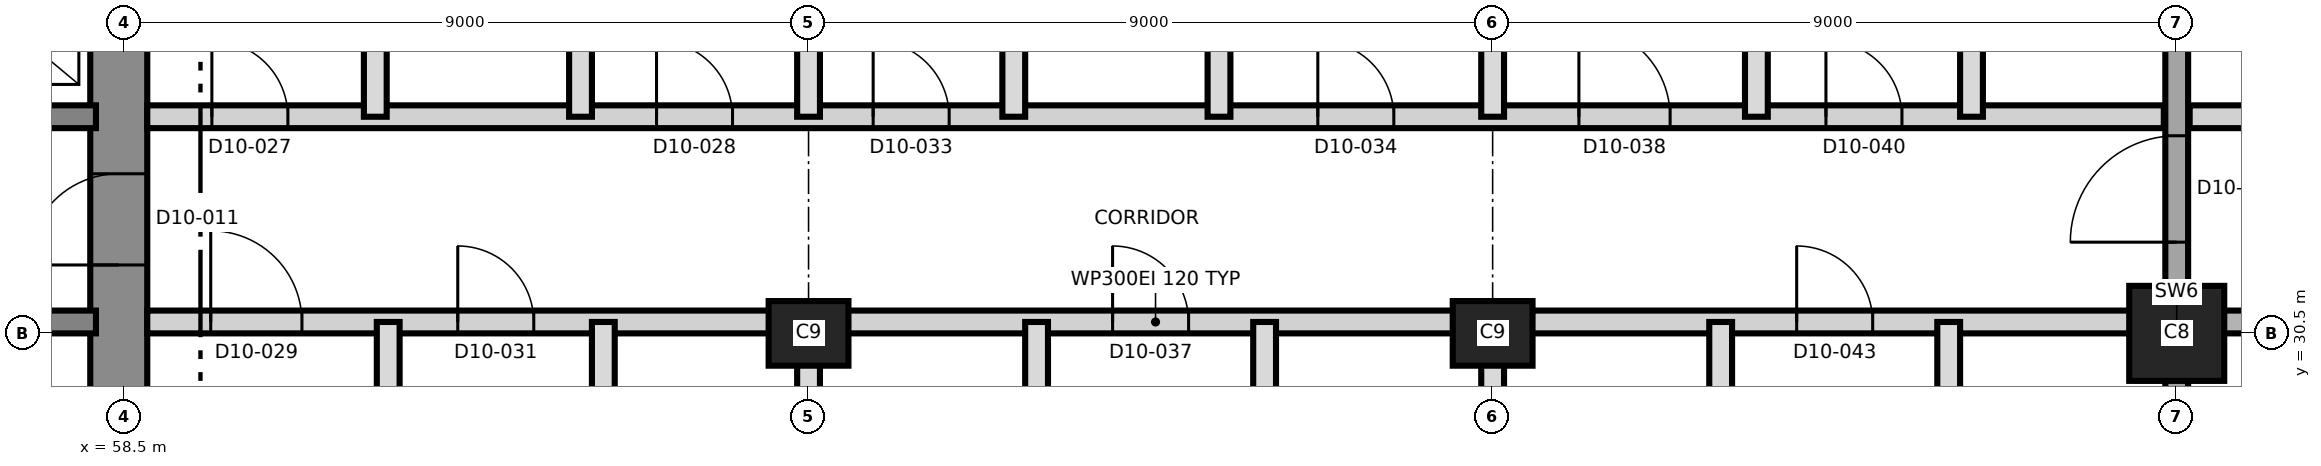
"""IFC4 building model, lengths in metres.
Left out: names, types, materials, properties, quantities, classifications, styles, units other than length and angle.
Written with IfcOpenShell. Run it as: python <this file> out.ifc"""

import sys

from ifc_helpers import new_model, si_unit, direction, frame, frame_2d, origin, origin_2d, place, context, subcontext, project, spatial, rectangle, extrude, element, fill, save


model = new_model("IFC4")
c1 = context("Model", 3, precision=1e-05, world=origin(), true_north=direction((0.0, 1.0)))
c2 = subcontext(c1, "Body", "Model", "MODEL_VIEW")
j1 = project(units=[si_unit("LENGTHUNIT", "METRE"), si_unit("PLANEANGLEUNIT", "RADIAN")], contexts=[c1])
p1 = place(None, origin())
s1 = spatial("IfcSite", under=j1, at=p1, CompositionType="ELEMENT")
p2 = place(p1, origin())
s2 = spatial("IfcBuilding", under=s1, at=p2, CompositionType="ELEMENT")
p3 = place(p2, frame((0.0, 0.0, 120.4)))
s3 = spatial("IfcBuildingStorey", under=s2, at=p3, CompositionType="ELEMENT", Elevation=120.4)
p4 = place(p3, frame((58.425, 21.125, 0.0), z_axis=(0.0, 0.0, 1.0), x_axis=(0.0, 1.0, 0.0)))
e1 = element("IfcWall", 1, at=p4, inside=s3, PredefinedType="SHEAR", context=c2, shape_type="SweptSolid", body=[
    extrude(rectangle(XDim=18.75, YDim=0.75, at=frame_2d((9.375, 0.0))), origin(), (0.0, 0.0, 1.0), 3.7),
])
p5 = place(p4, frame((10.275, 0.0, 0.0)))
e2 = element("IfcOpeningElement", 2, at=p5, cuts=e1, PredefinedType="OPENING", context=c2, shape_type="SweptSolid", body=[
    extrude(rectangle(XDim=1.2, YDim=2.1, at=frame_2d((0.6, 1.05))), frame((0.0, 0.385, 0.0), z_axis=(0.0, -1.0, 0.0), x_axis=(1.0, 0.0, 0.0)), (0.0, 0.0, 1.0), 0.77),
])
p6 = place(p3, frame((31.875, 30.65, 0.0), z_axis=(0.0, 0.0, 1.0), x_axis=(1.0, 0.0, 0.0)))
e3 = element("IfcWall", 3, at=p6, inside=s3, PredefinedType="SHEAR", context=c2, shape_type="SweptSolid", body=[
    extrude(rectangle(XDim=26.25, YDim=0.3, at=frame_2d((13.125, 0.0))), origin(), (0.0, 0.0, 1.0), 3.7),
])
p7 = place(p6, frame((24.625, 0.0, 0.0)))
e4 = element("IfcOpeningElement", 4, at=p7, cuts=e3, PredefinedType="OPENING", context=c2, shape_type="SweptSolid", body=[
    extrude(rectangle(XDim=1.0, YDim=2.1, at=frame_2d((0.5, 1.05))), frame((0.0, 0.16, 0.0), z_axis=(0.0, -1.0, 0.0), x_axis=(1.0, 0.0, 0.0)), (0.0, 0.0, 1.0), 0.32),
])
p8 = place(p6, frame((11.425, 0.0, 0.0)))
e5 = element("IfcOpeningElement", 5, at=p8, cuts=e3, PredefinedType="OPENING", context=c2, shape_type="SweptSolid", body=[
    extrude(rectangle(XDim=1.0, YDim=2.1, at=frame_2d((0.5, 1.05))), frame((0.0, 0.16, 0.0), z_axis=(0.0, -1.0, 0.0), x_axis=(1.0, 0.0, 0.0)), (0.0, 0.0, 1.0), 0.32),
])
p9 = place(p3, frame((31.875, 33.35, 0.0), z_axis=(0.0, 0.0, 1.0), x_axis=(1.0, 0.0, 0.0)))
e6 = element("IfcWall", 6, at=p9, inside=s3, PredefinedType="SHEAR", context=c2, shape_type="SweptSolid", body=[
    extrude(rectangle(XDim=26.25, YDim=0.3, at=frame_2d((13.125, 0.0))), origin(), (0.0, 0.0, 1.0), 3.7),
])
p10 = place(p9, frame((13.775, 0.0, 0.0)))
e7 = element("IfcOpeningElement", 7, at=p10, cuts=e6, PredefinedType="OPENING", context=c2, shape_type="SweptSolid", body=[
    extrude(rectangle(XDim=1.4, YDim=2.1, at=frame_2d((0.7, 1.05))), frame((0.0, 0.16, 0.0), z_axis=(0.0, -1.0, 0.0), x_axis=(1.0, 0.0, 0.0)), (0.0, 0.0, 1.0), 0.32),
])
p11 = place(p9, frame((5.25, 0.0, 0.0)))
e8 = element("IfcOpeningElement", 8, at=p11, cuts=e6, PredefinedType="OPENING", context=c2, shape_type="SweptSolid", body=[
    extrude(rectangle(XDim=1.2, YDim=2.1, at=frame_2d((0.6, 1.05))), frame((0.0, 0.16, 0.0), z_axis=(0.0, -1.0, 0.0), x_axis=(1.0, 0.0, 0.0)), (0.0, 0.0, 1.0), 0.32),
])
p12 = place(p9, frame((19.8, 0.0, 0.0)))
e9 = element("IfcOpeningElement", 9, at=p12, cuts=e6, PredefinedType="OPENING", context=c2, shape_type="SweptSolid", body=[
    extrude(rectangle(XDim=1.2, YDim=2.1, at=frame_2d((0.6, 1.05))), frame((0.0, 0.16, 0.0), z_axis=(0.0, -1.0, 0.0), x_axis=(1.0, 0.0, 0.0)), (0.0, 0.0, 1.0), 0.32),
])
for number, where, z_axis, x_axis in (
    (10, (67.5, 30.5, 0.0), (0.0, 0.0, 1.0), (1.0, 0.0, 0.0)),
    (11, (76.5, 30.5, 0.0), (0.0, 0.0, 1.0), (1.0, 0.0, 0.0)),
):
    element("IfcColumn", number, at=place(p3, frame(where, z_axis=z_axis, x_axis=x_axis)), inside=s3, PredefinedType="COLUMN", context=c2, shape_type="SweptSolid", body=[
        extrude(rectangle(XDim=1.05, YDim=0.85, at=origin_2d()), origin(), (0.0, 0.0, 1.0), 3.7),
    ])
p13 = place(p3, frame((85.5, 30.5, 0.0), z_axis=(0.0, 0.0, 1.0), x_axis=(1.0, 0.0, 0.0)))
e12 = element("IfcColumn", 12, at=p13, inside=s3, PredefinedType="COLUMN", context=c2, shape_type="SweptSolid", body=[
    extrude(rectangle(XDim=1.25, YDim=1.25, at=origin_2d()), origin(), (0.0, 0.0, 1.0), 3.7),
])
p14 = place(p3, frame((85.5, 19.275, 0.0), z_axis=(0.0, 0.0, 1.0), x_axis=(0.0, 1.0, 0.0)))
e13 = element("IfcWall", 13, at=p14, inside=s3, PredefinedType="SHEAR", context=c2, shape_type="SweptSolid", body=[
    extrude(rectangle(XDim=22.45, YDim=0.3, at=frame_2d((11.225, 0.0))), origin(), (0.0, 0.0, 1.0), 3.7),
])
p15 = place(p14, frame((12.425, 0.0, 0.0)))
e14 = element("IfcOpeningElement", 14, at=p15, cuts=e13, PredefinedType="OPENING", context=c2, shape_type="SweptSolid", body=[
    extrude(rectangle(XDim=1.4, YDim=2.1, at=frame_2d((0.7, 1.05))), frame((0.0, 0.16, 0.0), z_axis=(0.0, -1.0, 0.0), x_axis=(1.0, 0.0, 0.0)), (0.0, 0.0, 1.0), 0.32),
])
p16 = place(p3, frame((58.8, 30.65, 0.0), z_axis=(0.0, 0.0, 1.0), x_axis=(1.0, 0.0, 0.0)))
e15 = element("IfcWall", 15, at=p16, inside=s3, PredefinedType="PARTITIONING", context=c2, shape_type="SweptSolid", body=[
    extrude(rectangle(XDim=26.53, YDim=0.3, at=frame_2d((13.265, 0.0))), origin(), (0.0, 0.0, 1.0), 3.4),
])
p17 = place(p16, frame((0.835, 0.0, 0.0)))
e16 = element("IfcOpeningElement", 16, at=p17, cuts=e15, PredefinedType="OPENING", context=c2, shape_type="SweptSolid", body=[
    extrude(rectangle(XDim=1.2, YDim=2.1, at=frame_2d((0.6, 1.05))), frame((0.0, 0.16, 0.0), z_axis=(0.0, -1.0, 0.0), x_axis=(1.0, 0.0, 0.0)), (0.0, 0.0, 1.0), 0.32),
])
p18 = place(p16, frame((4.085, 0.0, 0.0)))
e17 = element("IfcOpeningElement", 17, at=p18, cuts=e15, PredefinedType="OPENING", context=c2, shape_type="SweptSolid", body=[
    extrude(rectangle(XDim=1.0, YDim=2.1, at=frame_2d((0.5, 1.05))), frame((0.0, 0.16, 0.0), z_axis=(0.0, -1.0, 0.0), x_axis=(1.0, 0.0, 0.0)), (0.0, 0.0, 1.0), 0.32),
])
p19 = place(p16, frame((12.7, 0.0, 0.0)))
e18 = element("IfcOpeningElement", 18, at=p19, cuts=e15, PredefinedType="OPENING", context=c2, shape_type="SweptSolid", body=[
    extrude(rectangle(XDim=1.0, YDim=2.4, at=frame_2d((0.5, 1.2))), frame((0.0, 0.16, 0.0), z_axis=(0.0, -1.0, 0.0), x_axis=(1.0, 0.0, 0.0)), (0.0, 0.0, 1.0), 0.32),
])
p20 = place(p16, frame((21.7, 0.0, 0.0)))
e19 = element("IfcOpeningElement", 19, at=p20, cuts=e15, PredefinedType="OPENING", context=c2, shape_type="SweptSolid", body=[
    extrude(rectangle(XDim=1.0, YDim=2.4, at=frame_2d((0.5, 1.2))), frame((0.0, 0.16, 0.0), z_axis=(0.0, -1.0, 0.0), x_axis=(1.0, 0.0, 0.0)), (0.0, 0.0, 1.0), 0.32),
])
p21 = place(p3, frame((85.67, 30.65, 0.0), z_axis=(0.0, 0.0, 1.0), x_axis=(1.0, 0.0, 0.0)))
e20 = element("IfcWall", 20, at=p21, inside=s3, PredefinedType="SHEAR", context=c2, shape_type="SweptSolid", body=[
    extrude(rectangle(XDim=9.58, YDim=0.3, at=frame_2d((4.79, 0.0))), origin(), (0.0, 0.0, 1.0), 3.4),
])
p22 = place(p21, frame((2.08, 0.0, 0.0)))
e21 = element("IfcOpeningElement", 21, at=p22, cuts=e20, PredefinedType="OPENING", context=c2, shape_type="SweptSolid", body=[
    extrude(rectangle(XDim=1.2, YDim=2.1, at=frame_2d((0.6, 1.05))), frame((0.0, 0.16, 0.0), z_axis=(0.0, -1.0, 0.0), x_axis=(1.0, 0.0, 0.0)), (0.0, 0.0, 1.0), 0.32),
])
p23 = place(p21, frame((5.63, 0.0, 0.0)))
e22 = element("IfcOpeningElement", 22, at=p23, cuts=e20, PredefinedType="OPENING", context=c2, shape_type="SweptSolid", body=[
    extrude(rectangle(XDim=1.0, YDim=2.1, at=frame_2d((0.5, 1.05))), frame((0.0, 0.16, 0.0), z_axis=(0.0, -1.0, 0.0), x_axis=(1.0, 0.0, 0.0)), (0.0, 0.0, 1.0), 0.32),
])
p24 = place(p3, frame((58.8, 33.35, 0.0), z_axis=(0.0, 0.0, 1.0), x_axis=(1.0, 0.0, 0.0)))
e23 = element("IfcWall", 23, at=p24, inside=s3, PredefinedType="PARTITIONING", context=c2, shape_type="SweptSolid", body=[
    extrude(rectangle(XDim=26.53, YDim=0.3, at=frame_2d((13.265, 0.0))), origin(), (0.0, 0.0, 1.0), 3.4),
])
p25 = place(p24, frame((0.85, 0.0, 0.0)))
e24 = element("IfcOpeningElement", 24, at=p25, cuts=e23, PredefinedType="OPENING", context=c2, shape_type="SweptSolid", body=[
    extrude(rectangle(XDim=1.0, YDim=2.1, at=frame_2d((0.5, 1.05))), frame((0.0, 0.16, 0.0), z_axis=(0.0, -1.0, 0.0), x_axis=(1.0, 0.0, 0.0)), (0.0, 0.0, 1.0), 0.32),
])
p26 = place(p24, frame((6.7, 0.0, 0.0)))
e25 = element("IfcOpeningElement", 25, at=p26, cuts=e23, PredefinedType="OPENING", context=c2, shape_type="SweptSolid", body=[
    extrude(rectangle(XDim=1.0, YDim=2.1, at=frame_2d((0.5, 1.05))), frame((0.0, 0.16, 0.0), z_axis=(0.0, -1.0, 0.0), x_axis=(1.0, 0.0, 0.0)), (0.0, 0.0, 1.0), 0.32),
])
p27 = place(p24, frame((9.55, 0.0, 0.0)))
e26 = element("IfcOpeningElement", 26, at=p27, cuts=e23, PredefinedType="OPENING", context=c2, shape_type="SweptSolid", body=[
    extrude(rectangle(XDim=1.0, YDim=2.1, at=frame_2d((0.5, 1.05))), frame((0.0, 0.16, 0.0), z_axis=(0.0, -1.0, 0.0), x_axis=(1.0, 0.0, 0.0)), (0.0, 0.0, 1.0), 0.32),
])
p28 = place(p24, frame((15.4, 0.0, 0.0)))
e27 = element("IfcOpeningElement", 27, at=p28, cuts=e23, PredefinedType="OPENING", context=c2, shape_type="SweptSolid", body=[
    extrude(rectangle(XDim=1.0, YDim=2.1, at=frame_2d((0.5, 1.05))), frame((0.0, 0.16, 0.0), z_axis=(0.0, -1.0, 0.0), x_axis=(1.0, 0.0, 0.0)), (0.0, 0.0, 1.0), 0.32),
])
p29 = place(p24, frame((18.835, 0.0, 0.0)))
e28 = element("IfcOpeningElement", 28, at=p29, cuts=e23, PredefinedType="OPENING", context=c2, shape_type="SweptSolid", body=[
    extrude(rectangle(XDim=1.2, YDim=2.1, at=frame_2d((0.6, 1.05))), frame((0.0, 0.16, 0.0), z_axis=(0.0, -1.0, 0.0), x_axis=(1.0, 0.0, 0.0)), (0.0, 0.0, 1.0), 0.32),
])
p30 = place(p24, frame((22.085, 0.0, 0.0)))
e29 = element("IfcOpeningElement", 29, at=p30, cuts=e23, PredefinedType="OPENING", context=c2, shape_type="SweptSolid", body=[
    extrude(rectangle(XDim=1.0, YDim=2.1, at=frame_2d((0.5, 1.05))), frame((0.0, 0.16, 0.0), z_axis=(0.0, -1.0, 0.0), x_axis=(1.0, 0.0, 0.0)), (0.0, 0.0, 1.0), 0.32),
])
p31 = place(p3, frame((85.67, 33.35, 0.0), z_axis=(0.0, 0.0, 1.0), x_axis=(1.0, 0.0, 0.0)))
e30 = element("IfcWall", 30, at=p31, inside=s3, PredefinedType="PARTITIONING", context=c2, shape_type="SweptSolid", body=[
    extrude(rectangle(XDim=9.58, YDim=0.3, at=frame_2d((4.79, 0.0))), origin(), (0.0, 0.0, 1.0), 3.4),
])
p32 = place(p31, frame((1.83, 0.0, 0.0)))
e31 = element("IfcOpeningElement", 31, at=p32, cuts=e30, PredefinedType="OPENING", context=c2, shape_type="SweptSolid", body=[
    extrude(rectangle(XDim=1.0, YDim=2.1, at=frame_2d((0.5, 1.05))), frame((0.0, 0.16, 0.0), z_axis=(0.0, -1.0, 0.0), x_axis=(1.0, 0.0, 0.0)), (0.0, 0.0, 1.0), 0.32),
])
p33 = place(p31, frame((5.63, 0.0, 0.0)))
e32 = element("IfcOpeningElement", 32, at=p33, cuts=e30, PredefinedType="OPENING", context=c2, shape_type="SweptSolid", body=[
    extrude(rectangle(XDim=1.0, YDim=2.1, at=frame_2d((0.5, 1.05))), frame((0.0, 0.16, 0.0), z_axis=(0.0, -1.0, 0.0), x_axis=(1.0, 0.0, 0.0)), (0.0, 0.0, 1.0), 0.32),
])
p34 = place(p3, frame((61.8, 33.35, 0.0), z_axis=(0.0, 0.0, 1.0), x_axis=(0.0, 1.0, 0.0)))
e33 = element("IfcWall", 33, at=p34, inside=s3, PredefinedType="PARTITIONING", context=c2, shape_type="SweptSolid", body=[
    extrude(rectangle(XDim=3.2, YDim=0.3, at=frame_2d((1.6, 0.0))), origin(), (0.0, 0.0, 1.0), 3.4),
])
p35 = place(p3, frame((61.97, 19.275, 0.0), z_axis=(0.0, 0.0, 1.0), x_axis=(0.0, 1.0, 0.0)))
e34 = element("IfcWall", 34, at=p35, inside=s3, PredefinedType="PARTITIONING", context=c2, shape_type="SweptSolid", body=[
    extrude(rectangle(XDim=11.375, YDim=0.3, at=frame_2d((5.688, 0.0))), origin(), (0.0, 0.0, 1.0), 3.35),
])
p36 = place(p3, frame((64.5, 33.35, 0.0), z_axis=(0.0, 0.0, 1.0), x_axis=(0.0, 1.0, 0.0)))
e35 = element("IfcWall", 35, at=p36, inside=s3, PredefinedType="PARTITIONING", context=c2, shape_type="SweptSolid", body=[
    extrude(rectangle(XDim=8.555, YDim=0.3, at=frame_2d((4.277, 0.0))), origin(), (0.0, 0.0, 1.0), 3.35),
])
p37 = place(p3, frame((64.8, 27.45, 0.0), z_axis=(0.0, 0.0, 1.0), x_axis=(0.0, 1.0, 0.0)))
e36 = element("IfcWall", 36, at=p37, inside=s3, PredefinedType="PARTITIONING", context=c2, shape_type="SweptSolid", body=[
    extrude(rectangle(XDim=3.2, YDim=0.3, at=frame_2d((1.6, 0.0))), origin(), (0.0, 0.0, 1.0), 3.4),
])
p38 = place(p3, frame((67.5, 19.275, 0.0), z_axis=(0.0, 0.0, 1.0), x_axis=(0.0, 1.0, 0.0)))
e37 = element("IfcWall", 37, at=p38, inside=s3, PredefinedType="PARTITIONING", context=c2, shape_type="SweptSolid", body=[
    extrude(rectangle(XDim=11.375, YDim=0.3, at=frame_2d((5.688, 0.0))), origin(), (0.0, 0.0, 1.0), 3.35),
])
p39 = place(p3, frame((67.5, 33.35, 0.0), z_axis=(0.0, 0.0, 1.0), x_axis=(0.0, 1.0, 0.0)))
e38 = element("IfcWall", 38, at=p39, inside=s3, PredefinedType="PARTITIONING", context=c2, shape_type="SweptSolid", body=[
    extrude(rectangle(XDim=8.555, YDim=0.3, at=frame_2d((4.277, 0.0))), origin(), (0.0, 0.0, 1.0), 3.35),
])
p40 = place(p3, frame((70.2, 33.35, 0.0), z_axis=(0.0, 0.0, 1.0), x_axis=(0.0, 1.0, 0.0)))
e39 = element("IfcWall", 39, at=p40, inside=s3, PredefinedType="PARTITIONING", context=c2, shape_type="SweptSolid", body=[
    extrude(rectangle(XDim=3.2, YDim=0.3, at=frame_2d((1.6, 0.0))), origin(), (0.0, 0.0, 1.0), 3.4),
])
p41 = place(p3, frame((70.5, 27.35, 0.0), z_axis=(0.0, 0.0, 1.0), x_axis=(0.0, 1.0, 0.0)))
e40 = element("IfcWall", 40, at=p41, inside=s3, PredefinedType="PARTITIONING", context=c2, shape_type="SweptSolid", body=[
    extrude(rectangle(XDim=3.3, YDim=0.3, at=frame_2d((1.65, 0.0))), origin(), (0.0, 0.0, 1.0), 3.4),
])
p42 = place(p3, frame((72.9, 33.35, 0.0), z_axis=(0.0, 0.0, 1.0), x_axis=(0.0, 1.0, 0.0)))
e41 = element("IfcWall", 41, at=p42, inside=s3, PredefinedType="PARTITIONING", context=c2, shape_type="SweptSolid", body=[
    extrude(rectangle(XDim=8.555, YDim=0.3, at=frame_2d((4.277, 0.0))), origin(), (0.0, 0.0, 1.0), 3.35),
])
p43 = place(p3, frame((73.5, 27.35, 0.0), z_axis=(0.0, 0.0, 1.0), x_axis=(0.0, 1.0, 0.0)))
e42 = element("IfcWall", 42, at=p43, inside=s3, PredefinedType="PARTITIONING", context=c2, shape_type="SweptSolid", body=[
    extrude(rectangle(XDim=3.3, YDim=0.3, at=frame_2d((1.65, 0.0))), origin(), (0.0, 0.0, 1.0), 3.4),
])
p44 = place(p3, frame((76.5, 19.275, 0.0), z_axis=(0.0, 0.0, 1.0), x_axis=(0.0, 1.0, 0.0)))
e43 = element("IfcWall", 43, at=p44, inside=s3, PredefinedType="PARTITIONING", context=c2, shape_type="SweptSolid", body=[
    extrude(rectangle(XDim=11.375, YDim=0.3, at=frame_2d((5.688, 0.0))), origin(), (0.0, 0.0, 1.0), 3.35),
])
p45 = place(p3, frame((76.5, 33.35, 0.0), z_axis=(0.0, 0.0, 1.0), x_axis=(0.0, 1.0, 0.0)))
e44 = element("IfcWall", 44, at=p45, inside=s3, PredefinedType="PARTITIONING", context=c2, shape_type="SweptSolid", body=[
    extrude(rectangle(XDim=8.555, YDim=0.3, at=frame_2d((4.277, 0.0))), origin(), (0.0, 0.0, 1.0), 3.35),
])
p46 = place(p3, frame((79.5, 27.35, 0.0), z_axis=(0.0, 0.0, 1.0), x_axis=(0.0, 1.0, 0.0)))
e45 = element("IfcWall", 45, at=p46, inside=s3, PredefinedType="PARTITIONING", context=c2, shape_type="SweptSolid", body=[
    extrude(rectangle(XDim=3.3, YDim=0.3, at=frame_2d((1.65, 0.0))), origin(), (0.0, 0.0, 1.0), 3.4),
])
p47 = place(p3, frame((79.97, 33.35, 0.0), z_axis=(0.0, 0.0, 1.0), x_axis=(0.0, 1.0, 0.0)))
e46 = element("IfcWall", 46, at=p47, inside=s3, PredefinedType="PARTITIONING", context=c2, shape_type="SweptSolid", body=[
    extrude(rectangle(XDim=8.555, YDim=0.3, at=frame_2d((4.277, 0.0))), origin(), (0.0, 0.0, 1.0), 3.35),
])
p48 = place(p3, frame((82.5, 27.35, 0.0), z_axis=(0.0, 0.0, 1.0), x_axis=(0.0, 1.0, 0.0)))
e47 = element("IfcWall", 47, at=p48, inside=s3, PredefinedType="PARTITIONING", context=c2, shape_type="SweptSolid", body=[
    extrude(rectangle(XDim=3.3, YDim=0.3, at=frame_2d((1.65, 0.0))), origin(), (0.0, 0.0, 1.0), 3.4),
])
p49 = place(p3, frame((82.8, 33.35, 0.0), z_axis=(0.0, 0.0, 1.0), x_axis=(0.0, 1.0, 0.0)))
e48 = element("IfcWall", 48, at=p49, inside=s3, PredefinedType="PARTITIONING", context=c2, shape_type="SweptSolid", body=[
    extrude(rectangle(XDim=3.2, YDim=0.3, at=frame_2d((1.6, 0.0))), origin(), (0.0, 0.0, 1.0), 3.4),
])
p50 = place(p5, origin())
e49 = element("IfcDoor", 49, at=p50, inside=s3, OperationType="SINGLE_SWING_LEFT", PredefinedType="DOOR", context=c2, shape_type="SweptSolid", body=[
    extrude(rectangle(XDim=1.2, YDim=2.1, at=frame_2d((0.6, 1.05))), frame((0.0, 0.025, 0.0), z_axis=(0.0, -1.0, 0.0), x_axis=(1.0, 0.0, 0.0)), (0.0, 0.0, 1.0), 0.05),
])
fill(e2, e49)
p51 = place(p25, origin())
e50 = element("IfcDoor", 50, at=p51, inside=s3, OperationType="SINGLE_SWING_LEFT", PredefinedType="DOOR", context=c2, shape_type="SweptSolid", body=[
    extrude(rectangle(XDim=1.0, YDim=2.1, at=frame_2d((0.5, 1.05))), frame((0.0, 0.025, 0.0), z_axis=(0.0, -1.0, 0.0), x_axis=(1.0, 0.0, 0.0)), (0.0, 0.0, 1.0), 0.05),
])
fill(e24, e50)
p52 = place(p26, origin())
e51 = element("IfcDoor", 51, at=p52, inside=s3, OperationType="SINGLE_SWING_RIGHT", PredefinedType="DOOR", context=c2, shape_type="SweptSolid", body=[
    extrude(rectangle(XDim=1.0, YDim=2.1, at=frame_2d((0.5, 1.05))), frame((0.0, 0.025, 0.0), z_axis=(0.0, -1.0, 0.0), x_axis=(1.0, 0.0, 0.0)), (0.0, 0.0, 1.0), 0.05),
])
fill(e25, e51)
p53 = place(p17, origin())
e52 = element("IfcDoor", 52, at=p53, inside=s3, OperationType="SINGLE_SWING_LEFT", PredefinedType="DOOR", context=c2, shape_type="SweptSolid", body=[
    extrude(rectangle(XDim=1.2, YDim=2.1, at=frame_2d((0.6, 1.05))), frame((0.0, 0.025, 0.0), z_axis=(0.0, -1.0, 0.0), x_axis=(1.0, 0.0, 0.0)), (0.0, 0.0, 1.0), 0.05),
])
fill(e16, e52)
p54 = place(p18, origin())
e53 = element("IfcDoor", 53, at=p54, inside=s3, OperationType="SINGLE_SWING_LEFT", PredefinedType="DOOR", context=c2, shape_type="SweptSolid", body=[
    extrude(rectangle(XDim=1.0, YDim=2.1, at=frame_2d((0.5, 1.05))), frame((0.0, 0.025, 0.0), z_axis=(0.0, -1.0, 0.0), x_axis=(1.0, 0.0, 0.0)), (0.0, 0.0, 1.0), 0.05),
])
fill(e17, e53)
p55 = place(p27, origin())
e54 = element("IfcDoor", 54, at=p55, inside=s3, OperationType="SINGLE_SWING_LEFT", PredefinedType="DOOR", context=c2, shape_type="SweptSolid", body=[
    extrude(rectangle(XDim=1.0, YDim=2.1, at=frame_2d((0.5, 1.05))), frame((0.0, 0.025, 0.0), z_axis=(0.0, -1.0, 0.0), x_axis=(1.0, 0.0, 0.0)), (0.0, 0.0, 1.0), 0.05),
])
fill(e26, e54)
p56 = place(p28, origin())
e55 = element("IfcDoor", 55, at=p56, inside=s3, OperationType="SINGLE_SWING_RIGHT", PredefinedType="DOOR", context=c2, shape_type="SweptSolid", body=[
    extrude(rectangle(XDim=1.0, YDim=2.1, at=frame_2d((0.5, 1.05))), frame((0.0, 0.025, 0.0), z_axis=(0.0, -1.0, 0.0), x_axis=(1.0, 0.0, 0.0)), (0.0, 0.0, 1.0), 0.05),
])
fill(e27, e55)
p57 = place(p19, origin())
e56 = element("IfcDoor", 56, at=p57, inside=s3, OperationType="SINGLE_SWING_LEFT", PredefinedType="DOOR", context=c2, shape_type="SweptSolid", body=[
    extrude(rectangle(XDim=1.0, YDim=2.4, at=frame_2d((0.5, 1.2))), frame((0.0, 0.025, 0.0), z_axis=(0.0, -1.0, 0.0), x_axis=(1.0, 0.0, 0.0)), (0.0, 0.0, 1.0), 0.05),
])
fill(e18, e56)
p58 = place(p29, origin())
e57 = element("IfcDoor", 57, at=p58, inside=s3, OperationType="SINGLE_SWING_LEFT", PredefinedType="DOOR", context=c2, shape_type="SweptSolid", body=[
    extrude(rectangle(XDim=1.2, YDim=2.1, at=frame_2d((0.6, 1.05))), frame((0.0, 0.025, 0.0), z_axis=(0.0, -1.0, 0.0), x_axis=(1.0, 0.0, 0.0)), (0.0, 0.0, 1.0), 0.05),
])
fill(e28, e57)
p59 = place(p30, origin())
e58 = element("IfcDoor", 58, at=p59, inside=s3, OperationType="SINGLE_SWING_LEFT", PredefinedType="DOOR", context=c2, shape_type="SweptSolid", body=[
    extrude(rectangle(XDim=1.0, YDim=2.1, at=frame_2d((0.5, 1.05))), frame((0.0, 0.025, 0.0), z_axis=(0.0, -1.0, 0.0), x_axis=(1.0, 0.0, 0.0)), (0.0, 0.0, 1.0), 0.05),
])
fill(e29, e58)
p60 = place(p20, origin())
e59 = element("IfcDoor", 59, at=p60, inside=s3, OperationType="SINGLE_SWING_LEFT", PredefinedType="DOOR", context=c2, shape_type="SweptSolid", body=[
    extrude(rectangle(XDim=1.0, YDim=2.4, at=frame_2d((0.5, 1.2))), frame((0.0, 0.025, 0.0), z_axis=(0.0, -1.0, 0.0), x_axis=(1.0, 0.0, 0.0)), (0.0, 0.0, 1.0), 0.05),
])
fill(e19, e59)
p61 = place(p15, origin())
e60 = element("IfcDoor", 60, at=p61, inside=s3, OperationType="SINGLE_SWING_RIGHT", PredefinedType="DOOR", context=c2, shape_type="SweptSolid", body=[
    extrude(rectangle(XDim=1.4, YDim=2.1, at=frame_2d((0.7, 1.05))), frame((0.0, 0.025, 0.0), z_axis=(0.0, -1.0, 0.0), x_axis=(1.0, 0.0, 0.0)), (0.0, 0.0, 1.0), 0.05),
])
fill(e14, e60)
save(model, sys.argv[1])
